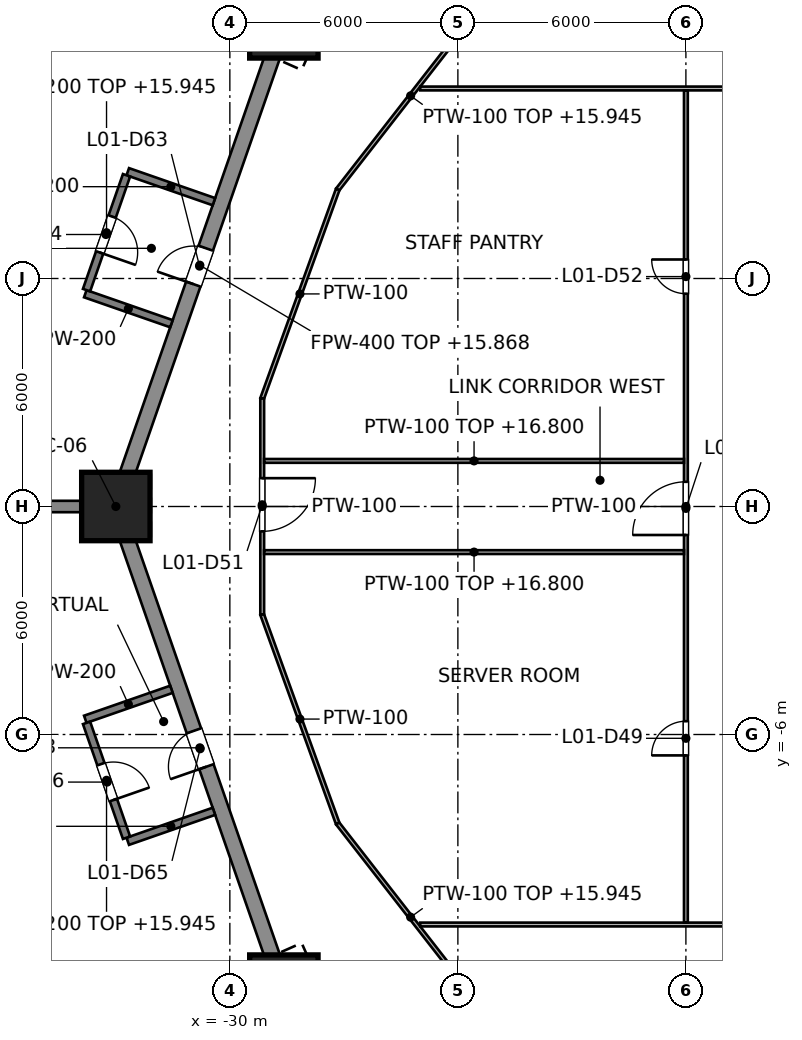
"""IFC4 building model, lengths in metres.
Left out: names, types, materials, properties, quantities, classifications, styles, units other than length and angle.
Written with IfcOpenShell. Run it as: python <this file> out.ifc"""

import sys

from ifc_helpers import new_model, si_unit, direction, frame, frame_2d, origin, origin_2d, place, context, subcontext, project, spatial, rectangle, hollow_rectangle, extrude, element, fill, save


model = new_model("IFC4")
c1 = context("Model", 3, precision=1e-05, world=origin(), true_north=direction((0.0, 1.0)))
c2 = subcontext(c1, "Body", "Model", "MODEL_VIEW")
j1 = project(units=[si_unit("LENGTHUNIT", "METRE"), si_unit("PLANEANGLEUNIT", "RADIAN")], contexts=[c1])
p1 = place(None, origin())
s1 = spatial("IfcSite", under=j1, at=p1, CompositionType="ELEMENT")
p2 = place(p1, origin())
s2 = spatial("IfcBuilding", under=s1, at=p2, CompositionType="ELEMENT")
p3 = place(p2, frame((0.0, 0.0, 8.0)))
s3 = spatial("IfcBuildingStorey", under=s2, at=p3, CompositionType="ELEMENT", Elevation=8.0)
for number, where, z_axis, x_axis in (
    (1, (-28.579, 12.7, 0.0), (0.0, 0.0, 1.0), (-0.914, 0.406, 0.0)),
    (2, (-33.0, 0.0, 0.0), (0.0, 0.0, 1.0), (-1.0, 0.0, 0.0)),
    (3, (-28.579, -12.7, 0.0), (0.0, 0.0, 1.0), (-0.914, -0.406, 0.0)),
):
    element("IfcColumn", number, at=place(p3, frame(where, z_axis=z_axis, x_axis=x_axis)), inside=s3, PredefinedType="COLUMN", context=c2, shape_type="SweptSolid", body=[
        extrude(hollow_rectangle(XDim=1.8, YDim=1.8, WallThickness=0.08, at=origin_2d()), origin(), (0.0, 0.0, 1.0), 9.0),
    ])
p4 = place(p3, frame((-28.579, 12.7, 0.0), z_axis=(0.0, 0.0, 1.0), x_axis=(-0.328770590399, -0.944409815117, 0.0)))
e4 = element("IfcWall", 4, at=p4, inside=s3, PredefinedType="PARTITIONING", context=c2, shape_type="SweptSolid", body=[
    extrude(rectangle(XDim=13.448, YDim=0.4, at=frame_2d((6.724, 0.0))), origin(), (0.0, 0.0, 1.0), 7.868),
])
p5 = place(p4, frame((6.25, 0.0, 0.0)))
e5 = element("IfcOpeningElement", 5, at=p5, cuts=e4, PredefinedType="OPENING", context=c2, shape_type="SweptSolid", body=[
    extrude(rectangle(XDim=1.0, YDim=2.1, at=frame_2d((0.5, 1.05))), frame((0.0, 0.2, 0.0), z_axis=(0.0, -1.0, 0.0), x_axis=(1.0, 0.0, 0.0)), (0.0, 0.0, 1.0), 0.4),
])
p6 = place(p3, frame((-33.0, 0.0, 0.0), z_axis=(0.0, 0.0, 1.0), x_axis=(0.328770590399, -0.944409815117, 0.0)))
e6 = element("IfcWall", 6, at=p6, inside=s3, PredefinedType="PARTITIONING", context=c2, shape_type="SweptSolid", body=[
    extrude(rectangle(XDim=13.448, YDim=0.4, at=frame_2d((6.724, 0.0))), origin(), (0.0, 0.0, 1.0), 7.868),
])
p7 = place(p6, frame((6.25, 0.0, 0.0)))
e7 = element("IfcOpeningElement", 7, at=p7, cuts=e6, PredefinedType="OPENING", context=c2, shape_type="SweptSolid", body=[
    extrude(rectangle(XDim=1.0, YDim=2.1, at=frame_2d((0.5, 1.05))), frame((0.0, 0.2, 0.0), z_axis=(0.0, -1.0, 0.0), x_axis=(1.0, 0.0, 0.0)), (0.0, 0.0, 1.0), 0.4),
])
p8 = place(p3, frame((-23.325, 13.271, 0.0), z_axis=(0.0, 0.0, 1.0), x_axis=(-0.614354540541, -0.78903009988, 0.0)))
e8 = element("IfcWall", 8, at=p8, inside=s3, PredefinedType="PARTITIONING", context=c2, shape_type="SweptSolid", body=[
    extrude(rectangle(XDim=6.246, YDim=0.1, at=frame_2d((3.123, 0.0))), origin(), (0.0, 0.0, 1.0), 7.945),
])
p9 = place(p3, frame((-27.162, 8.343, 0.0), z_axis=(0.0, 0.0, 1.0), x_axis=(-0.339837423604, -0.940484197378, 0.0)))
e9 = element("IfcWall", 9, at=p9, inside=s3, PredefinedType="PARTITIONING", context=c2, shape_type="SweptSolid", body=[
    extrude(rectangle(XDim=5.845, YDim=0.1, at=frame_2d((2.922, 0.0))), origin(), (0.0, 0.0, 1.0), 7.877),
])
p10 = place(p3, frame((-29.148, 2.845, 0.0), z_axis=(0.0, 0.0, 1.0), x_axis=(0.0, -1.0, 0.0)))
e10 = element("IfcWall", 10, at=p10, inside=s3, PredefinedType="PARTITIONING", context=c2, shape_type="SweptSolid", body=[
    extrude(rectangle(XDim=5.691, YDim=0.1, at=frame_2d((2.845, 0.0))), origin(), (0.0, 0.0, 1.0), 7.877),
])
p11 = place(p10, frame((2.1, 0.0, 0.0)))
e11 = element("IfcOpeningElement", 11, at=p11, cuts=e10, PredefinedType="OPENING", context=c2, shape_type="SweptSolid", body=[
    extrude(rectangle(XDim=1.4, YDim=2.1, at=frame_2d((0.7, 1.05))), frame((0.0, 0.05, 0.0), z_axis=(0.0, -1.0, 0.0), x_axis=(1.0, 0.0, 0.0)), (0.0, 0.0, 1.0), 0.1),
])
p12 = place(p3, frame((-29.148, -2.845, 0.0), z_axis=(0.0, 0.0, 1.0), x_axis=(0.339837423604, -0.940484197378, 0.0)))
e12 = element("IfcWall", 12, at=p12, inside=s3, PredefinedType="PARTITIONING", context=c2, shape_type="SweptSolid", body=[
    extrude(rectangle(XDim=5.845, YDim=0.1, at=frame_2d((2.922, 0.0))), origin(), (0.0, 0.0, 1.0), 7.877),
])
p13 = place(p3, frame((-27.162, -8.343, 0.0), z_axis=(0.0, 0.0, 1.0), x_axis=(0.614354540541, -0.78903009988, 0.0)))
e13 = element("IfcWall", 13, at=p13, inside=s3, PredefinedType="PARTITIONING", context=c2, shape_type="SweptSolid", body=[
    extrude(rectangle(XDim=6.246, YDim=0.1, at=frame_2d((3.123, 0.0))), origin(), (0.0, 0.0, 1.0), 7.945),
])
p14 = place(p3, frame((-24.99, 11.0, 0.0), z_axis=(0.0, 0.0, 1.0), x_axis=(1.0, 0.0, 0.0)))
e14 = element("IfcWall", 14, at=p14, inside=s3, PredefinedType="PARTITIONING", context=c2, shape_type="SweptSolid", body=[
    extrude(rectangle(XDim=49.981, YDim=0.1, at=frame_2d((24.99, 0.0))), origin(), (0.0, 0.0, 1.0), 7.877),
])
p15 = place(p14, frame((9.05, 0.0, 0.0)))
e15 = element("IfcOpeningElement", 15, at=p15, cuts=e14, PredefinedType="OPENING", context=c2, shape_type="SweptSolid", body=[
    extrude(rectangle(XDim=0.9, YDim=2.1, at=frame_2d((0.45, 1.05))), frame((0.0, 0.05, 0.0), z_axis=(0.0, -1.0, 0.0), x_axis=(1.0, 0.0, 0.0)), (0.0, 0.0, 1.0), 0.1),
])
p16 = place(p14, frame((17.45, 0.0, 0.0)))
e16 = element("IfcOpeningElement", 16, at=p16, cuts=e14, PredefinedType="OPENING", context=c2, shape_type="SweptSolid", body=[
    extrude(rectangle(XDim=0.9, YDim=2.1, at=frame_2d((0.45, 1.05))), frame((0.0, 0.05, 0.0), z_axis=(0.0, -1.0, 0.0), x_axis=(1.0, 0.0, 0.0)), (0.0, 0.0, 1.0), 0.1),
])
p17 = place(p14, frame((24.3, 0.0, 0.0)))
e17 = element("IfcOpeningElement", 17, at=p17, cuts=e14, PredefinedType="OPENING", context=c2, shape_type="SweptSolid", body=[
    extrude(rectangle(XDim=1.4, YDim=2.1, at=frame_2d((0.7, 1.05))), frame((0.0, 0.05, 0.0), z_axis=(0.0, -1.0, 0.0), x_axis=(1.0, 0.0, 0.0)), (0.0, 0.0, 1.0), 0.1),
])
p18 = place(p14, frame((31.65, 0.0, 0.0)))
e18 = element("IfcOpeningElement", 18, at=p18, cuts=e14, PredefinedType="OPENING", context=c2, shape_type="SweptSolid", body=[
    extrude(rectangle(XDim=0.9, YDim=2.1, at=frame_2d((0.45, 1.05))), frame((0.0, 0.05, 0.0), z_axis=(0.0, -1.0, 0.0), x_axis=(1.0, 0.0, 0.0)), (0.0, 0.0, 1.0), 0.1),
])
p19 = place(p14, frame((40.05, 0.0, 0.0)))
e19 = element("IfcOpeningElement", 19, at=p19, cuts=e14, PredefinedType="OPENING", context=c2, shape_type="SweptSolid", body=[
    extrude(rectangle(XDim=0.9, YDim=2.1, at=frame_2d((0.45, 1.05))), frame((0.0, 0.05, 0.0), z_axis=(0.0, -1.0, 0.0), x_axis=(1.0, 0.0, 0.0)), (0.0, 0.0, 1.0), 0.1),
])
p20 = place(p3, frame((-24.99, -11.0, 0.0), z_axis=(0.0, 0.0, 1.0), x_axis=(1.0, 0.0, 0.0)))
e20 = element("IfcWall", 20, at=p20, inside=s3, PredefinedType="PARTITIONING", context=c2, shape_type="SweptSolid", body=[
    extrude(rectangle(XDim=49.981, YDim=0.1, at=frame_2d((24.99, 0.0))), origin(), (0.0, 0.0, 1.0), 7.877),
])
p21 = place(p20, frame((8.55, 0.0, 0.0)))
e21 = element("IfcOpeningElement", 21, at=p21, cuts=e20, PredefinedType="OPENING", context=c2, shape_type="SweptSolid", body=[
    extrude(rectangle(XDim=0.9, YDim=2.1, at=frame_2d((0.45, 1.05))), frame((0.0, 0.05, 0.0), z_axis=(0.0, -1.0, 0.0), x_axis=(1.0, 0.0, 0.0)), (0.0, 0.0, 1.0), 0.1),
])
p22 = place(p20, frame((16.95, 0.0, 0.0)))
e22 = element("IfcOpeningElement", 22, at=p22, cuts=e20, PredefinedType="OPENING", context=c2, shape_type="SweptSolid", body=[
    extrude(rectangle(XDim=0.9, YDim=2.1, at=frame_2d((0.45, 1.05))), frame((0.0, 0.05, 0.0), z_axis=(0.0, -1.0, 0.0), x_axis=(1.0, 0.0, 0.0)), (0.0, 0.0, 1.0), 0.1),
])
p23 = place(p20, frame((24.3, 0.0, 0.0)))
e23 = element("IfcOpeningElement", 23, at=p23, cuts=e20, PredefinedType="OPENING", context=c2, shape_type="SweptSolid", body=[
    extrude(rectangle(XDim=1.4, YDim=2.1, at=frame_2d((0.7, 1.05))), frame((0.0, 0.05, 0.0), z_axis=(0.0, -1.0, 0.0), x_axis=(1.0, 0.0, 0.0)), (0.0, 0.0, 1.0), 0.1),
])
p24 = place(p20, frame((29.65, 0.0, 0.0)))
e24 = element("IfcOpeningElement", 24, at=p24, cuts=e20, PredefinedType="OPENING", context=c2, shape_type="SweptSolid", body=[
    extrude(rectangle(XDim=0.9, YDim=2.1, at=frame_2d((0.45, 1.05))), frame((0.0, 0.05, 0.0), z_axis=(0.0, -1.0, 0.0), x_axis=(1.0, 0.0, 0.0)), (0.0, 0.0, 1.0), 0.1),
])
p25 = place(p20, frame((38.05, 0.0, 0.0)))
e25 = element("IfcOpeningElement", 25, at=p25, cuts=e20, PredefinedType="OPENING", context=c2, shape_type="SweptSolid", body=[
    extrude(rectangle(XDim=0.9, YDim=2.1, at=frame_2d((0.45, 1.05))), frame((0.0, 0.05, 0.0), z_axis=(0.0, -1.0, 0.0), x_axis=(1.0, 0.0, 0.0)), (0.0, 0.0, 1.0), 0.1),
])
p26 = place(p3, frame((-18.0, -10.95, 0.0), z_axis=(0.0, 0.0, 1.0), x_axis=(0.0, 1.0, 0.0)))
e26 = element("IfcWall", 26, at=p26, inside=s3, PredefinedType="PARTITIONING", context=c2, shape_type="SweptSolid", body=[
    extrude(rectangle(XDim=21.9, YDim=0.1, at=frame_2d((10.95, 0.0))), origin(), (0.0, 0.0, 1.0), 7.877),
])
p27 = place(p26, frame((4.4, 0.0, 0.0)))
e27 = element("IfcOpeningElement", 27, at=p27, cuts=e26, PredefinedType="OPENING", context=c2, shape_type="SweptSolid", body=[
    extrude(rectangle(XDim=0.9, YDim=2.1, at=frame_2d((0.45, 1.05))), frame((0.0, 0.05, 0.0), z_axis=(0.0, -1.0, 0.0), x_axis=(1.0, 0.0, 0.0)), (0.0, 0.0, 1.0), 0.1),
])
p28 = place(p26, frame((10.2, 0.0, 0.0)))
e28 = element("IfcOpeningElement", 28, at=p28, cuts=e26, PredefinedType="OPENING", context=c2, shape_type="SweptSolid", body=[
    extrude(rectangle(XDim=1.4, YDim=2.1, at=frame_2d((0.7, 1.05))), frame((0.0, 0.05, 0.0), z_axis=(0.0, -1.0, 0.0), x_axis=(1.0, 0.0, 0.0)), (0.0, 0.0, 1.0), 0.1),
])
p29 = place(p26, frame((16.55, 0.0, 0.0)))
e29 = element("IfcOpeningElement", 29, at=p29, cuts=e26, PredefinedType="OPENING", context=c2, shape_type="SweptSolid", body=[
    extrude(rectangle(XDim=0.9, YDim=2.1, at=frame_2d((0.45, 1.05))), frame((0.0, 0.05, 0.0), z_axis=(0.0, -1.0, 0.0), x_axis=(1.0, 0.0, 0.0)), (0.0, 0.0, 1.0), 0.1),
])
for number, where, z_axis, x_axis in (
    (30, (-18.05, -1.2, 0.0), (0.0, 0.0, 1.0), (-1.0, 0.0, 0.0)),
    (31, (-18.05, 1.2, 0.0), (0.0, 0.0, 1.0), (-1.0, 0.0, 0.0)),
):
    element("IfcWall", number, at=place(p3, frame(where, z_axis=z_axis, x_axis=x_axis)), inside=s3, PredefinedType="PARTITIONING", context=c2, shape_type="SweptSolid", body=[
        extrude(rectangle(XDim=11.048, YDim=0.1, at=frame_2d((5.524, 0.0))), origin(), (0.0, 0.0, 1.0), 8.8),
    ])
p30 = place(p3, frame((-33.2, 0.0, 0.0), z_axis=(0.0, 0.0, 1.0), x_axis=(-1.0, 0.0, 0.0)))
e32 = element("IfcWall", 32, at=p30, inside=s3, PredefinedType="PARTITIONING", context=c2, shape_type="SweptSolid", body=[
    extrude(rectangle(XDim=14.598, YDim=0.3, at=frame_2d((7.299, 0.0))), origin(), (0.0, 0.0, 1.0), 8.026),
])
for number, where, z_axis, x_axis in (
    (33, (-30.419, 8.021, 0.0), (0.0, 0.0, 1.0), (-0.944, 0.329, 0.0)),
    (34, (-31.537, 4.81, 0.0), (0.0, 0.0, 1.0), (-0.944, 0.329, 0.0)),
):
    element("IfcWall", number, at=place(p3, frame(where, z_axis=z_axis, x_axis=x_axis)), inside=s3, PredefinedType="PARTITIONING", context=c2, shape_type="SweptSolid", body=[
        extrude(rectangle(XDim=2.4, YDim=0.2, at=frame_2d((1.2, 0.0))), origin(), (0.0, 0.0, 1.0), 8.8),
    ])
p31 = place(p3, frame((-32.719, 8.716, 0.0), z_axis=(0.0, 0.0, 1.0), x_axis=(-0.328742544754, -0.944419577978, 0.0)))
e35 = element("IfcWall", 35, at=p31, inside=s3, PredefinedType="PARTITIONING", context=c2, shape_type="SweptSolid", body=[
    extrude(rectangle(XDim=3.2, YDim=0.2, at=frame_2d((1.6, 0.0))), origin(), (0.0, 0.0, 1.0), 7.945),
])
p32 = place(p31, frame((1.15, 0.0, 0.0)))
e36 = element("IfcOpeningElement", 36, at=p32, cuts=e35, PredefinedType="OPENING", context=c2, shape_type="SweptSolid", body=[
    extrude(rectangle(XDim=1.0, YDim=2.1, at=frame_2d((0.5, 1.05))), frame((0.0, 0.1, 0.0), z_axis=(0.0, -1.0, 0.0), x_axis=(1.0, 0.0, 0.0)), (0.0, 0.0, 1.0), 0.2),
])
for number, where, z_axis, x_axis in (
    (37, (-31.537, -4.81, 0.0), (0.0, 0.0, 1.0), (-0.944, -0.329, 0.0)),
    (38, (-30.419, -8.021, 0.0), (0.0, 0.0, 1.0), (-0.944, -0.329, 0.0)),
):
    element("IfcWall", number, at=place(p3, frame(where, z_axis=z_axis, x_axis=x_axis)), inside=s3, PredefinedType="PARTITIONING", context=c2, shape_type="SweptSolid", body=[
        extrude(rectangle(XDim=2.4, YDim=0.2, at=frame_2d((1.2, 0.0))), origin(), (0.0, 0.0, 1.0), 8.8),
    ])
p33 = place(p3, frame((-33.771, -5.694, 0.0), z_axis=(0.0, 0.0, 1.0), x_axis=(0.328742544754, -0.944419577978, 0.0)))
e39 = element("IfcWall", 39, at=p33, inside=s3, PredefinedType="PARTITIONING", context=c2, shape_type="SweptSolid", body=[
    extrude(rectangle(XDim=3.2, YDim=0.2, at=frame_2d((1.6, 0.0))), origin(), (0.0, 0.0, 1.0), 7.945),
])
p34 = place(p33, frame((1.15, 0.0, 0.0)))
e40 = element("IfcOpeningElement", 40, at=p34, cuts=e39, PredefinedType="OPENING", context=c2, shape_type="SweptSolid", body=[
    extrude(rectangle(XDim=1.0, YDim=2.1, at=frame_2d((0.5, 1.05))), frame((0.0, 0.1, 0.0), z_axis=(0.0, -1.0, 0.0), x_axis=(1.0, 0.0, 0.0)), (0.0, 0.0, 1.0), 0.2),
])
p35 = place(p27, origin())
e41 = element("IfcDoor", 41, at=p35, inside=s3, OperationType="SINGLE_SWING_LEFT", PredefinedType="DOOR", context=c2, shape_type="SweptSolid", body=[
    extrude(rectangle(XDim=0.9, YDim=2.1, at=frame_2d((0.45, 1.05))), frame((0.0, 0.025, 0.0), z_axis=(0.0, -1.0, 0.0), x_axis=(1.0, 0.0, 0.0)), (0.0, 0.0, 1.0), 0.05),
])
fill(e27, e41)
p36 = place(p28, origin())
e42 = element("IfcDoor", 42, at=p36, inside=s3, OperationType="SINGLE_SWING_LEFT", PredefinedType="DOOR", context=c2, shape_type="SweptSolid", body=[
    extrude(rectangle(XDim=1.4, YDim=2.1, at=frame_2d((0.7, 1.05))), frame((0.0, 0.025, 0.0), z_axis=(0.0, -1.0, 0.0), x_axis=(1.0, 0.0, 0.0)), (0.0, 0.0, 1.0), 0.05),
])
fill(e28, e42)
p37 = place(p11, origin())
e43 = element("IfcDoor", 43, at=p37, inside=s3, OperationType="SINGLE_SWING_LEFT", PredefinedType="DOOR", context=c2, shape_type="SweptSolid", body=[
    extrude(rectangle(XDim=1.4, YDim=2.1, at=frame_2d((0.7, 1.05))), frame((0.0, 0.025, 0.0), z_axis=(0.0, -1.0, 0.0), x_axis=(1.0, 0.0, 0.0)), (0.0, 0.0, 1.0), 0.05),
])
fill(e11, e43)
p38 = place(p29, origin())
e44 = element("IfcDoor", 44, at=p38, inside=s3, OperationType="SINGLE_SWING_RIGHT", PredefinedType="DOOR", context=c2, shape_type="SweptSolid", body=[
    extrude(rectangle(XDim=0.9, YDim=2.1, at=frame_2d((0.45, 1.05))), frame((0.0, 0.025, 0.0), z_axis=(0.0, -1.0, 0.0), x_axis=(1.0, 0.0, 0.0)), (0.0, 0.0, 1.0), 0.05),
])
fill(e29, e44)
p39 = place(p5, origin())
e45 = element("IfcDoor", 45, at=p39, inside=s3, OperationType="SINGLE_SWING_RIGHT", PredefinedType="DOOR", context=c2, shape_type="SweptSolid", body=[
    extrude(rectangle(XDim=1.0, YDim=2.1, at=frame_2d((0.5, 1.05))), frame((0.0, 0.025, 0.0), z_axis=(0.0, -1.0, 0.0), x_axis=(1.0, 0.0, 0.0)), (0.0, 0.0, 1.0), 0.05),
])
fill(e5, e45)
p40 = place(p32, origin())
e46 = element("IfcDoor", 46, at=p40, inside=s3, OperationType="SINGLE_SWING_RIGHT", PredefinedType="DOOR", context=c2, shape_type="SweptSolid", body=[
    extrude(rectangle(XDim=1.0, YDim=2.1, at=frame_2d((0.5, 1.05))), frame((0.0, 0.025, 0.0), z_axis=(0.0, -1.0, 0.0), x_axis=(1.0, 0.0, 0.0)), (0.0, 0.0, 1.0), 0.05),
])
fill(e36, e46)
p41 = place(p7, origin())
e47 = element("IfcDoor", 47, at=p41, inside=s3, OperationType="SINGLE_SWING_RIGHT", PredefinedType="DOOR", context=c2, shape_type="SweptSolid", body=[
    extrude(rectangle(XDim=1.0, YDim=2.1, at=frame_2d((0.5, 1.05))), frame((0.0, 0.025, 0.0), z_axis=(0.0, -1.0, 0.0), x_axis=(1.0, 0.0, 0.0)), (0.0, 0.0, 1.0), 0.05),
])
fill(e7, e47)
p42 = place(p34, origin())
e48 = element("IfcDoor", 48, at=p42, inside=s3, OperationType="SINGLE_SWING_RIGHT", PredefinedType="DOOR", context=c2, shape_type="SweptSolid", body=[
    extrude(rectangle(XDim=1.0, YDim=2.1, at=frame_2d((0.5, 1.05))), frame((0.0, 0.025, 0.0), z_axis=(0.0, -1.0, 0.0), x_axis=(1.0, 0.0, 0.0)), (0.0, 0.0, 1.0), 0.05),
])
fill(e40, e48)
save(model, sys.argv[1])
